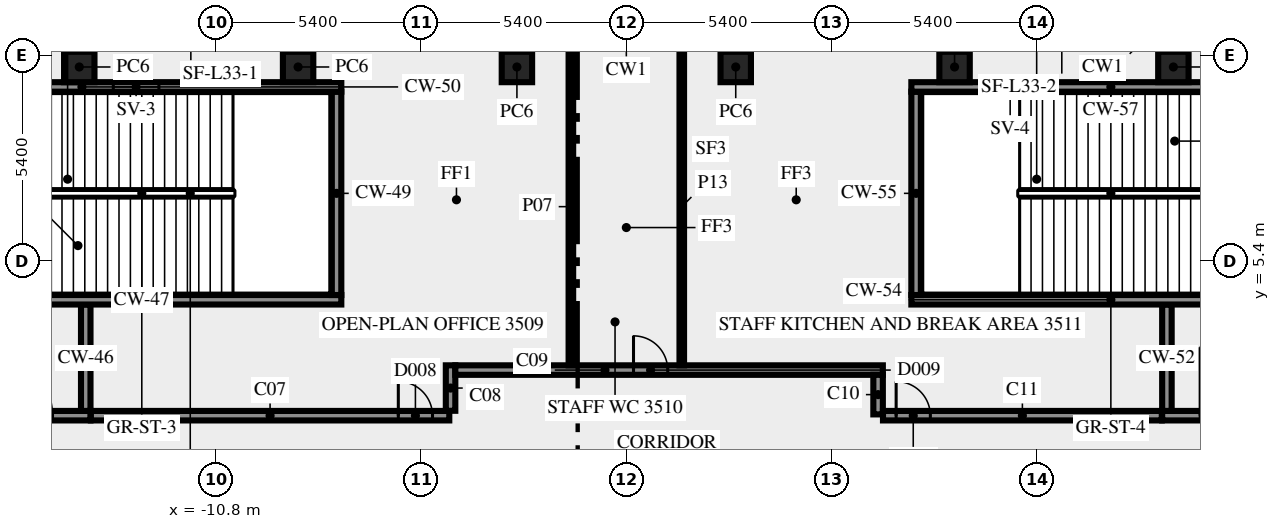
"""IFC4 building model, lengths in metres.
Left out: names, types, materials, properties, quantities, classifications, styles, units other than length and angle.
Written with IfcOpenShell. Run it as: python <this file> out.ifc"""

import sys

from ifc_helpers import new_model, si_unit, direction, frame, frame_2d, origin, origin_2d, place, context, subcontext, project, spatial, rectangle, extrude, element, fill, save


model = new_model("IFC4")
c1 = context("Model", 3, precision=1e-05, world=origin(), true_north=direction((0.0, 1.0)))
c2 = subcontext(c1, "Body", "Model", "MODEL_VIEW")
j1 = project(units=[si_unit("LENGTHUNIT", "METRE"), si_unit("PLANEANGLEUNIT", "RADIAN")], contexts=[c1])
p1 = place(None, origin())
s1 = spatial("IfcSite", under=j1, at=p1, CompositionType="ELEMENT")
p2 = place(p1, origin())
s2 = spatial("IfcBuilding", under=s1, at=p2, CompositionType="ELEMENT")
p3 = place(p2, frame((0.0, 0.0, 152.0)))
s3 = spatial("IfcBuildingStorey", under=s2, at=p3, CompositionType="ELEMENT", Elevation=152.0)
for number, where, z_axis, x_axis in (
    (1, (14.395, 10.5, 0.0), (0.0, 0.0, 1.0), (-1.0, 0.0, 0.0)),
    (2, (8.637, 10.5, 0.0), (0.0, 0.0, 1.0), (-1.0, 0.0, 0.0)),
    (3, (2.879, 10.5, 0.0), (0.0, 0.0, 1.0), (-1.0, 0.0, 0.0)),
    (4, (-2.879, 10.5, 0.0), (0.0, 0.0, 1.0), (-1.0, 0.0, 0.0)),
    (5, (-8.637, 10.5, 0.0), (0.0, 0.0, 1.0), (-1.0, 0.0, 0.0)),
    (6, (-14.395, 10.5, 0.0), (0.0, 0.0, 1.0), (-1.0, 0.0, 0.0)),
):
    element("IfcColumn", number, at=place(p3, frame(where, z_axis=z_axis, x_axis=x_axis)), inside=s3, PredefinedType="COLUMN", context=c2, shape_type="SweptSolid", body=[
        extrude(rectangle(XDim=0.8, YDim=0.8, at=origin_2d()), origin(), (0.0, 0.0, 1.0), 3.65),
    ])
p4 = place(p3, frame((-18.0, 1.325, 0.0), z_axis=(0.0, 0.0, 1.0), x_axis=(1.0, 0.0, 0.0)))
e7 = element("IfcWall", 7, at=p4, inside=s3, PredefinedType="SHEAR", context=c2, shape_type="SweptSolid", body=[
    extrude(rectangle(XDim=3.9, YDim=0.25, at=frame_2d((1.95, 0.0))), origin(), (0.0, 0.0, 1.0), 3.65),
])
p5 = place(p4, frame((1.1, 0.0, 0.0)))
e8 = element("IfcOpeningElement", 8, at=p5, cuts=e7, PredefinedType="OPENING", context=c2, shape_type="SweptSolid", body=[
    extrude(rectangle(XDim=1.8, YDim=2.1, at=frame_2d((0.9, 1.05))), frame((0.0, 0.135, 0.0), z_axis=(0.0, -1.0, 0.0), x_axis=(1.0, 0.0, 0.0)), (0.0, 0.0, 1.0), 0.27),
])
p6 = place(p3, frame((-14.225, 1.45, 0.0), z_axis=(0.0, 0.0, 1.0), x_axis=(0.0, 1.0, 0.0)))
e9 = element("IfcWall", 9, at=p6, inside=s3, PredefinedType="SHEAR", context=c2, shape_type="SweptSolid", body=[
    extrude(rectangle(XDim=2.8, YDim=0.25, at=frame_2d((1.4, 0.0))), origin(), (0.0, 0.0, 1.0), 3.65),
])
p7 = place(p3, frame((-18.0, 4.375, 0.0), z_axis=(0.0, 0.0, 1.0), x_axis=(1.0, 0.0, 0.0)))
e10 = element("IfcWall", 10, at=p7, inside=s3, PredefinedType="SHEAR", context=c2, shape_type="SweptSolid", body=[
    extrude(rectangle(XDim=10.5, YDim=0.25, at=frame_2d((5.25, 0.0))), origin(), (0.0, 0.0, 1.0), 3.65),
])
p8 = place(p7, frame((0.3, 0.0, 0.0)))
e11 = element("IfcOpeningElement", 11, at=p8, cuts=e10, PredefinedType="OPENING", context=c2, shape_type="SweptSolid", body=[
    extrude(rectangle(XDim=1.8, YDim=2.1, at=frame_2d((0.9, 1.05))), frame((0.0, 0.135, 0.0), z_axis=(0.0, -1.0, 0.0), x_axis=(1.0, 0.0, 0.0)), (0.0, 0.0, 1.0), 0.27),
])
p9 = place(p3, frame((-7.625, 4.5, 0.0), z_axis=(0.0, 0.0, 1.0), x_axis=(0.0, 1.0, 0.0)))
e12 = element("IfcWall", 12, at=p9, inside=s3, PredefinedType="SHEAR", context=c2, shape_type="SweptSolid", body=[
    extrude(rectangle(XDim=5.35, YDim=0.25, at=frame_2d((2.675, 0.0))), origin(), (0.0, 0.0, 1.0), 3.65),
])
p10 = place(p3, frame((-18.0, 9.975, 0.0), z_axis=(0.0, 0.0, 1.0), x_axis=(1.0, 0.0, 0.0)))
e13 = element("IfcWall", 13, at=p10, inside=s3, PredefinedType="SHEAR", context=c2, shape_type="SweptSolid", body=[
    extrude(rectangle(XDim=10.5, YDim=0.25, at=frame_2d((5.25, 0.0))), origin(), (0.0, 0.0, 1.0), 3.65),
])
p11 = place(p10, frame((4.5, 0.0, 1.0)))
e14 = element("IfcOpeningElement", 14, at=p11, cuts=e13, PredefinedType="OPENING", context=c2, shape_type="SweptSolid", body=[
    extrude(rectangle(XDim=1.2, YDim=1.2, at=frame_2d((0.6, 0.6))), frame((0.0, 0.135, 0.0), z_axis=(0.0, -1.0, 0.0), x_axis=(1.0, 0.0, 0.0)), (0.0, 0.0, 1.0), 0.27),
])
p12 = place(p3, frame((14.1, 1.325, 0.0), z_axis=(0.0, 0.0, 1.0), x_axis=(1.0, 0.0, 0.0)))
e15 = element("IfcWall", 15, at=p12, inside=s3, PredefinedType="SHEAR", context=c2, shape_type="SweptSolid", body=[
    extrude(rectangle(XDim=3.9, YDim=0.25, at=frame_2d((1.95, 0.0))), origin(), (0.0, 0.0, 1.0), 3.65),
])
p13 = place(p12, frame((1.0, 0.0, 0.0)))
e16 = element("IfcOpeningElement", 16, at=p13, cuts=e15, PredefinedType="OPENING", context=c2, shape_type="SweptSolid", body=[
    extrude(rectangle(XDim=1.8, YDim=2.1, at=frame_2d((0.9, 1.05))), frame((0.0, 0.135, 0.0), z_axis=(0.0, -1.0, 0.0), x_axis=(1.0, 0.0, 0.0)), (0.0, 0.0, 1.0), 0.27),
])
p14 = place(p3, frame((14.225, 1.45, 0.0), z_axis=(0.0, 0.0, 1.0), x_axis=(0.0, 1.0, 0.0)))
e17 = element("IfcWall", 17, at=p14, inside=s3, PredefinedType="SHEAR", context=c2, shape_type="SweptSolid", body=[
    extrude(rectangle(XDim=2.8, YDim=0.25, at=frame_2d((1.4, 0.0))), origin(), (0.0, 0.0, 1.0), 3.65),
])
p15 = place(p3, frame((7.5, 4.375, 0.0), z_axis=(0.0, 0.0, 1.0), x_axis=(1.0, 0.0, 0.0)))
e18 = element("IfcWall", 18, at=p15, inside=s3, PredefinedType="SHEAR", context=c2, shape_type="SweptSolid", body=[
    extrude(rectangle(XDim=10.5, YDim=0.25, at=frame_2d((5.25, 0.0))), origin(), (0.0, 0.0, 1.0), 3.65),
])
p16 = place(p15, frame((8.4, 0.0, 0.0)))
e19 = element("IfcOpeningElement", 19, at=p16, cuts=e18, PredefinedType="OPENING", context=c2, shape_type="SweptSolid", body=[
    extrude(rectangle(XDim=1.8, YDim=2.1, at=frame_2d((0.9, 1.05))), frame((0.0, 0.135, 0.0), z_axis=(0.0, -1.0, 0.0), x_axis=(1.0, 0.0, 0.0)), (0.0, 0.0, 1.0), 0.27),
])
p17 = place(p3, frame((7.625, 4.5, 0.0), z_axis=(0.0, 0.0, 1.0), x_axis=(0.0, 1.0, 0.0)))
e20 = element("IfcWall", 20, at=p17, inside=s3, PredefinedType="SHEAR", context=c2, shape_type="SweptSolid", body=[
    extrude(rectangle(XDim=5.35, YDim=0.25, at=frame_2d((2.675, 0.0))), origin(), (0.0, 0.0, 1.0), 3.65),
])
p18 = place(p3, frame((7.5, 9.975, 0.0), z_axis=(0.0, 0.0, 1.0), x_axis=(1.0, 0.0, 0.0)))
e21 = element("IfcWall", 21, at=p18, inside=s3, PredefinedType="SHEAR", context=c2, shape_type="SweptSolid", body=[
    extrude(rectangle(XDim=10.5, YDim=0.25, at=frame_2d((5.25, 0.0))), origin(), (0.0, 0.0, 1.0), 3.65),
])
p19 = place(p18, frame((2.0, 0.0, 1.0)))
e22 = element("IfcOpeningElement", 22, at=p19, cuts=e21, PredefinedType="OPENING", context=c2, shape_type="SweptSolid", body=[
    extrude(rectangle(XDim=1.2, YDim=1.2, at=frame_2d((0.6, 0.6))), frame((0.0, 0.135, 0.0), z_axis=(0.0, -1.0, 0.0), x_axis=(1.0, 0.0, 0.0)), (0.0, 0.0, 1.0), 0.27),
])
p20 = place(p3, frame((-14.09, 1.325, 0.0), z_axis=(0.0, 0.0, 1.0), x_axis=(1.0, 0.0, 0.0)))
e23 = element("IfcWall", 23, at=p20, inside=s3, PredefinedType="SOLIDWALL", context=c2, shape_type="SweptSolid", body=[
    extrude(rectangle(XDim=9.431, YDim=0.25, at=frame_2d((4.716, 0.0))), origin(), (0.0, 0.0, 1.0), 3.65),
])
p21 = place(p20, frame((8.09, 0.0, 0.0)))
e24 = element("IfcOpeningElement", 24, at=p21, cuts=e23, PredefinedType="OPENING", context=c2, shape_type="SweptSolid", body=[
    extrude(rectangle(XDim=0.9, YDim=2.1, at=frame_2d((0.45, 1.05))), frame((0.0, 0.135, 0.0), z_axis=(0.0, -1.0, 0.0), x_axis=(1.0, 0.0, 0.0)), (0.0, 0.0, 1.0), 0.27),
])
p22 = place(p3, frame((-4.625, 1.454, 0.0), z_axis=(0.0, 0.0, 1.0), x_axis=(0.0, 1.0, 0.0)))
e25 = element("IfcWall", 25, at=p22, inside=s3, PredefinedType="SOLIDWALL", context=c2, shape_type="SweptSolid", body=[
    extrude(rectangle(XDim=1.196, YDim=0.25, at=frame_2d((0.598, 0.0))), origin(), (0.0, 0.0, 1.0), 3.65),
])
p23 = place(p3, frame((-4.5, 2.525, 0.0), z_axis=(0.0, 0.0, 1.0), x_axis=(1.0, 0.0, 0.0)))
e26 = element("IfcWall", 26, at=p23, inside=s3, PredefinedType="SOLIDWALL", context=c2, shape_type="SweptSolid", body=[
    extrude(rectangle(XDim=11.25, YDim=0.25, at=frame_2d((5.625, 0.0))), origin(), (0.0, 0.0, 1.0), 3.65),
])
p24 = place(p23, frame((4.689, 0.0, 0.0)))
e27 = element("IfcOpeningElement", 27, at=p24, cuts=e26, PredefinedType="OPENING", context=c2, shape_type="SweptSolid", body=[
    extrude(rectangle(XDim=0.9, YDim=2.1, at=frame_2d((0.45, 1.05))), frame((0.0, 0.135, 0.0), z_axis=(0.0, -1.0, 0.0), x_axis=(1.0, 0.0, 0.0)), (0.0, 0.0, 1.0), 0.27),
])
p25 = place(p3, frame((6.625, 2.4, 0.0), z_axis=(0.0, 0.0, 1.0), x_axis=(0.0, -1.0, 0.0)))
e28 = element("IfcWall", 28, at=p25, inside=s3, PredefinedType="SOLIDWALL", context=c2, shape_type="SweptSolid", body=[
    extrude(rectangle(XDim=1.041, YDim=0.25, at=frame_2d((0.521, 0.0))), origin(), (0.0, 0.0, 1.0), 3.65),
])
p26 = place(p3, frame((6.754, 1.325, 0.0), z_axis=(0.0, 0.0, 1.0), x_axis=(1.0, 0.0, 0.0)))
e29 = element("IfcWall", 29, at=p26, inside=s3, PredefinedType="SOLIDWALL", context=c2, shape_type="SweptSolid", body=[
    extrude(rectangle(XDim=7.336, YDim=0.25, at=frame_2d((3.668, 0.0))), origin(), (0.0, 0.0, 1.0), 3.65),
])
p27 = place(p26, frame((0.346, 0.0, 0.0)))
e30 = element("IfcOpeningElement", 30, at=p27, cuts=e29, PredefinedType="OPENING", context=c2, shape_type="SweptSolid", body=[
    extrude(rectangle(XDim=0.9, YDim=2.1, at=frame_2d((0.45, 1.05))), frame((0.0, 0.135, 0.0), z_axis=(0.0, -1.0, 0.0), x_axis=(1.0, 0.0, 0.0)), (0.0, 0.0, 1.0), 0.27),
])
for number, where, z_axis, x_axis in (
    (31, (-1.459, 2.65, 0.0), (0.0, 0.0, 1.0), (0.0, 1.0, 0.0)),
    (32, (1.459, 11.0, 0.0), (0.0, 0.0, 1.0), (0.0, -1.0, 0.0)),
):
    element("IfcWall", number, at=place(p3, frame(where, z_axis=z_axis, x_axis=x_axis)), inside=s3, PredefinedType="PARTITIONING", context=c2, shape_type="SweptSolid", body=[
        extrude(rectangle(XDim=8.35, YDim=0.12, at=frame_2d((4.175, 0.0))), origin(), (0.0, 0.0, 1.0), 2.85),
    ])
p28 = place(p5, origin())
e33 = element("IfcDoor", 33, at=p28, inside=s3, OperationType="DOUBLE_DOOR_SINGLE_SWING", PredefinedType="DOOR", context=c2, shape_type="SweptSolid", body=[
    extrude(rectangle(XDim=1.8, YDim=2.1, at=frame_2d((0.9, 1.05))), frame((0.0, 0.025, 0.0), z_axis=(0.0, -1.0, 0.0), x_axis=(1.0, 0.0, 0.0)), (0.0, 0.0, 1.0), 0.05),
])
fill(e8, e33)
p29 = place(p11, origin())
e34 = element("IfcWindow", 34, at=p29, inside=s3, PartitioningType="SINGLE_PANEL", PredefinedType="WINDOW", context=c2, shape_type="SweptSolid", body=[
    extrude(rectangle(XDim=1.2, YDim=1.2, at=frame_2d((0.6, 0.6))), frame((0.0, 0.03, 0.0), z_axis=(0.0, -1.0, 0.0), x_axis=(1.0, 0.0, 0.0)), (0.0, 0.0, 1.0), 0.06),
])
fill(e14, e34)
p30 = place(p13, origin())
e35 = element("IfcDoor", 35, at=p30, inside=s3, OperationType="DOUBLE_DOOR_SINGLE_SWING", PredefinedType="DOOR", context=c2, shape_type="SweptSolid", body=[
    extrude(rectangle(XDim=1.8, YDim=2.1, at=frame_2d((0.9, 1.05))), frame((0.0, 0.025, 0.0), z_axis=(0.0, -1.0, 0.0), x_axis=(1.0, 0.0, 0.0)), (0.0, 0.0, 1.0), 0.05),
])
fill(e16, e35)
p31 = place(p19, origin())
e36 = element("IfcWindow", 36, at=p31, inside=s3, PartitioningType="SINGLE_PANEL", PredefinedType="WINDOW", context=c2, shape_type="SweptSolid", body=[
    extrude(rectangle(XDim=1.2, YDim=1.2, at=frame_2d((0.6, 0.6))), frame((0.0, 0.03, 0.0), z_axis=(0.0, -1.0, 0.0), x_axis=(1.0, 0.0, 0.0)), (0.0, 0.0, 1.0), 0.06),
])
fill(e22, e36)
p32 = place(p21, origin())
e37 = element("IfcDoor", 37, at=p32, inside=s3, OperationType="SINGLE_SWING_RIGHT", PredefinedType="DOOR", context=c2, shape_type="SweptSolid", body=[
    extrude(rectangle(XDim=0.9, YDim=2.1, at=frame_2d((0.45, 1.05))), frame((0.0, 0.025, 0.0), z_axis=(0.0, -1.0, 0.0), x_axis=(1.0, 0.0, 0.0)), (0.0, 0.0, 1.0), 0.05),
])
fill(e24, e37)
p33 = place(p27, origin())
e38 = element("IfcDoor", 38, at=p33, inside=s3, OperationType="SINGLE_SWING_LEFT", PredefinedType="DOOR", context=c2, shape_type="SweptSolid", body=[
    extrude(rectangle(XDim=0.9, YDim=2.1, at=frame_2d((0.45, 1.05))), frame((0.0, 0.025, 0.0), z_axis=(0.0, -1.0, 0.0), x_axis=(1.0, 0.0, 0.0)), (0.0, 0.0, 1.0), 0.05),
])
fill(e30, e38)
p34 = place(p24, origin())
e39 = element("IfcDoor", 39, at=p34, inside=s3, OperationType="SINGLE_SWING_RIGHT", PredefinedType="DOOR", context=c2, shape_type="SweptSolid", body=[
    extrude(rectangle(XDim=0.9, YDim=2.1, at=frame_2d((0.45, 1.05))), frame((0.0, 0.025, 0.0), z_axis=(0.0, -1.0, 0.0), x_axis=(1.0, 0.0, 0.0)), (0.0, 0.0, 1.0), 0.05),
])
fill(e27, e39)
save(model, sys.argv[1])
